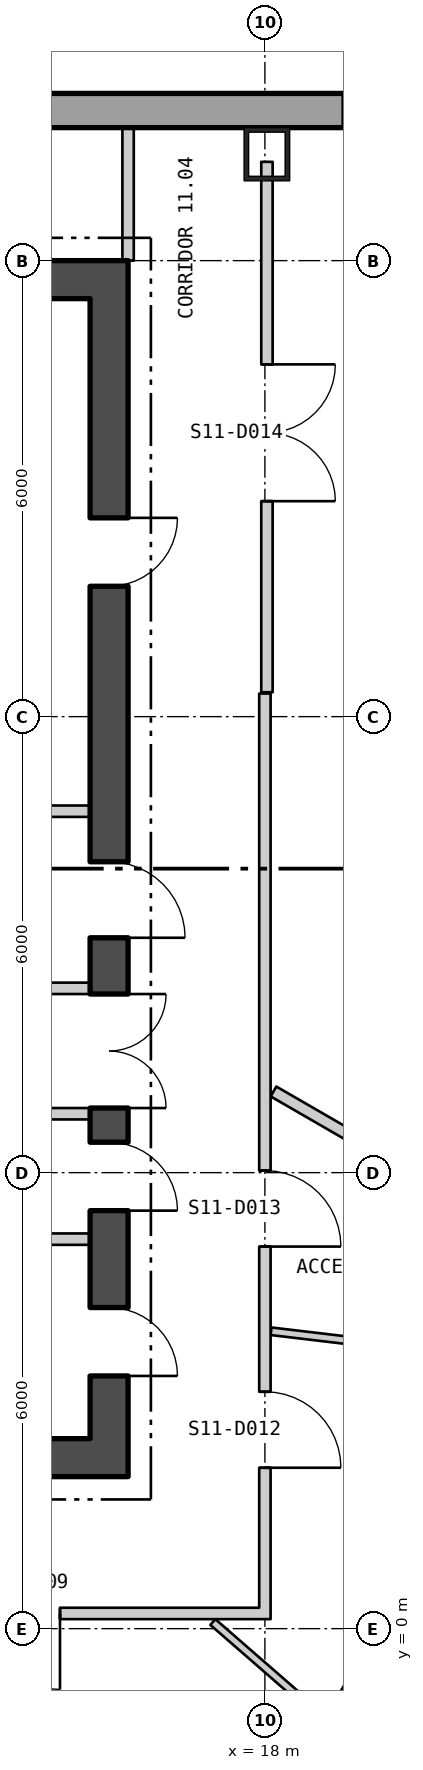
"""IFC4 building model, lengths in metres.
Left out: names, types, materials, properties, quantities, classifications, styles, units other than length and angle.
Written with IfcOpenShell. Run it as: python <this file> out.ifc"""

import sys

from ifc_helpers import new_model, si_unit, direction, frame, frame_2d, origin, origin_2d, place, context, subcontext, project, spatial, polyline, rectangle, hollow_rectangle, outline, extrude, element, fill, save


model = new_model("IFC4")
c1 = context("Model", 3, precision=1e-05, world=origin(), true_north=direction((0.0, 1.0)))
c2 = subcontext(c1, "Body", "Model", "MODEL_VIEW")
j1 = project(units=[si_unit("LENGTHUNIT", "METRE"), si_unit("PLANEANGLEUNIT", "RADIAN")], contexts=[c1])
p1 = place(None, origin())
s1 = spatial("IfcSite", under=j1, at=p1, CompositionType="ELEMENT")
p2 = place(p1, origin())
s2 = spatial("IfcBuilding", under=s1, at=p2, CompositionType="ELEMENT")
p3 = place(p2, frame((0.0, 0.0, 151.5)))
s3 = spatial("IfcBuildingStorey", under=s2, at=p3, CompositionType="ELEMENT", Elevation=151.5)
p4 = place(p3, frame((18.026, 19.4, 0.0), z_axis=(0.0, 0.0, 1.0), x_axis=(-1.0, 0.0, 0.0)))
e1 = element("IfcColumn", 1, at=p4, inside=s3, PredefinedType="COLUMN", context=c2, shape_type="SweptSolid", body=[
    extrude(hollow_rectangle(XDim=0.6, YDim=0.7, WallThickness=0.06, at=origin_2d()), origin(), (0.0, 0.0, 1.0), 3.9),
])
p5 = place(p3, frame((22.865, 19.975, -0.4), z_axis=(0.0, 0.0, 1.0), x_axis=(-1.0, 0.0, 0.0)))
e2 = element("IfcWall", 2, at=p5, inside=s3, PredefinedType="SOLIDWALL", context=c2, shape_type="SweptSolid", body=[
    extrude(outline(polyline([(-0.13, -0.225), (45.86, -0.225), (45.6, 0.225), (0.13, 0.225), (-0.13, -0.225)])), origin(), (0.0, 0.0, 1.0), 3.9),
])
p6 = place(p5, frame((1.424, 0.0, 1.3)))
e3 = element("IfcOpeningElement", 3, at=p6, cuts=e2, PredefinedType="OPENING", context=c2, shape_type="SweptSolid", body=[
    extrude(rectangle(XDim=2.4, YDim=2.0, at=frame_2d((1.2, 1.0))), frame((0.0, 0.235, 0.0), z_axis=(0.0, -1.0, 0.0), x_axis=(1.0, 0.0, 0.0)), (0.0, 0.0, 1.0), 0.47),
])
p7 = place(p5, frame((10.399, 0.0, 1.3)))
e4 = element("IfcOpeningElement", 4, at=p7, cuts=e2, PredefinedType="OPENING", context=c2, shape_type="SweptSolid", body=[
    extrude(rectangle(XDim=2.4, YDim=2.0, at=frame_2d((1.2, 1.0))), frame((0.0, 0.235, 0.0), z_axis=(0.0, -1.0, 0.0), x_axis=(1.0, 0.0, 0.0)), (0.0, 0.0, 1.0), 0.47),
])
p8 = place(p5, frame((14.905, 0.0, 1.3)))
e5 = element("IfcOpeningElement", 5, at=p8, cuts=e2, PredefinedType="OPENING", context=c2, shape_type="SweptSolid", body=[
    extrude(rectangle(XDim=2.4, YDim=2.0, at=frame_2d((1.2, 1.0))), frame((0.0, 0.235, 0.0), z_axis=(0.0, -1.0, 0.0), x_axis=(1.0, 0.0, 0.0)), (0.0, 0.0, 1.0), 0.47),
])
p9 = place(p5, frame((19.412, 0.0, 1.3)))
e6 = element("IfcOpeningElement", 6, at=p9, cuts=e2, PredefinedType="OPENING", context=c2, shape_type="SweptSolid", body=[
    extrude(rectangle(XDim=2.4, YDim=2.0, at=frame_2d((1.2, 1.0))), frame((0.0, 0.235, 0.0), z_axis=(0.0, -1.0, 0.0), x_axis=(1.0, 0.0, 0.0)), (0.0, 0.0, 1.0), 0.47),
])
p10 = place(p5, frame((23.918, 0.0, 1.3)))
e7 = element("IfcOpeningElement", 7, at=p10, cuts=e2, PredefinedType="OPENING", context=c2, shape_type="SweptSolid", body=[
    extrude(rectangle(XDim=2.4, YDim=2.0, at=frame_2d((1.2, 1.0))), frame((0.0, 0.235, 0.0), z_axis=(0.0, -1.0, 0.0), x_axis=(1.0, 0.0, 0.0)), (0.0, 0.0, 1.0), 0.47),
])
p11 = place(p5, frame((28.425, 0.0, 1.3)))
e8 = element("IfcOpeningElement", 8, at=p11, cuts=e2, PredefinedType="OPENING", context=c2, shape_type="SweptSolid", body=[
    extrude(rectangle(XDim=2.4, YDim=2.0, at=frame_2d((1.2, 1.0))), frame((0.0, 0.235, 0.0), z_axis=(0.0, -1.0, 0.0), x_axis=(1.0, 0.0, 0.0)), (0.0, 0.0, 1.0), 0.47),
])
p12 = place(p5, frame((32.932, 0.0, 1.3)))
e9 = element("IfcOpeningElement", 9, at=p12, cuts=e2, PredefinedType="OPENING", context=c2, shape_type="SweptSolid", body=[
    extrude(rectangle(XDim=2.4, YDim=2.0, at=frame_2d((1.2, 1.0))), frame((0.0, 0.235, 0.0), z_axis=(0.0, -1.0, 0.0), x_axis=(1.0, 0.0, 0.0)), (0.0, 0.0, 1.0), 0.47),
])
p13 = place(p5, frame((37.438, 0.0, 1.3)))
e10 = element("IfcOpeningElement", 10, at=p13, cuts=e2, PredefinedType="OPENING", context=c2, shape_type="SweptSolid", body=[
    extrude(rectangle(XDim=2.4, YDim=2.0, at=frame_2d((1.2, 1.0))), frame((0.0, 0.235, 0.0), z_axis=(0.0, -1.0, 0.0), x_axis=(1.0, 0.0, 0.0)), (0.0, 0.0, 1.0), 0.47),
])
p14 = place(p5, frame((41.907, 0.0, 1.3)))
e11 = element("IfcOpeningElement", 11, at=p14, cuts=e2, PredefinedType="OPENING", context=c2, shape_type="SweptSolid", body=[
    extrude(rectangle(XDim=2.4, YDim=2.0, at=frame_2d((1.2, 1.0))), frame((0.0, 0.235, 0.0), z_axis=(0.0, -1.0, 0.0), x_axis=(1.0, 0.0, 0.0)), (0.0, 0.0, 1.0), 0.47),
])
p15 = place(p3, frame((4.21, -26.921, -0.18), z_axis=(0.0, 0.0, 1.0), x_axis=(0.500000141277, 0.866025322218, 0.0)))
e12 = element("IfcWall", 12, at=p15, inside=s3, PredefinedType="SOLIDWALL", context=c2, shape_type="SweptSolid", body=[
    extrude(outline(polyline([(-0.13, -0.225), (45.86, -0.225), (45.6, 0.225), (0.13, 0.225), (-0.13, -0.225)])), origin(), (0.0, 0.0, 1.0), 3.68),
])
p16 = place(p15, frame((1.424, 0.0, 1.08)))
e13 = element("IfcOpeningElement", 13, at=p16, cuts=e12, PredefinedType="OPENING", context=c2, shape_type="SweptSolid", body=[
    extrude(rectangle(XDim=2.4, YDim=2.0, at=frame_2d((1.2, 1.0))), frame((0.0, 0.235, 0.0), z_axis=(0.0, -1.0, 0.0), x_axis=(1.0, 0.0, 0.0)), (0.0, 0.0, 1.0), 0.47),
])
p17 = place(p15, frame((5.892, 0.0, 1.08)))
e14 = element("IfcOpeningElement", 14, at=p17, cuts=e12, PredefinedType="OPENING", context=c2, shape_type="SweptSolid", body=[
    extrude(rectangle(XDim=2.4, YDim=2.0, at=frame_2d((1.2, 1.0))), frame((0.0, 0.235, 0.0), z_axis=(0.0, -1.0, 0.0), x_axis=(1.0, 0.0, 0.0)), (0.0, 0.0, 1.0), 0.47),
])
p18 = place(p15, frame((10.399, 0.0, 1.08)))
e15 = element("IfcOpeningElement", 15, at=p18, cuts=e12, PredefinedType="OPENING", context=c2, shape_type="SweptSolid", body=[
    extrude(rectangle(XDim=2.4, YDim=2.0, at=frame_2d((1.2, 1.0))), frame((0.0, 0.235, 0.0), z_axis=(0.0, -1.0, 0.0), x_axis=(1.0, 0.0, 0.0)), (0.0, 0.0, 1.0), 0.47),
])
p19 = place(p15, frame((14.905, 0.0, 1.08)))
e16 = element("IfcOpeningElement", 16, at=p19, cuts=e12, PredefinedType="OPENING", context=c2, shape_type="SweptSolid", body=[
    extrude(rectangle(XDim=2.4, YDim=2.0, at=frame_2d((1.2, 1.0))), frame((0.0, 0.235, 0.0), z_axis=(0.0, -1.0, 0.0), x_axis=(1.0, 0.0, 0.0)), (0.0, 0.0, 1.0), 0.47),
])
p20 = place(p15, frame((19.412, 0.0, 1.08)))
e17 = element("IfcOpeningElement", 17, at=p20, cuts=e12, PredefinedType="OPENING", context=c2, shape_type="SweptSolid", body=[
    extrude(rectangle(XDim=2.4, YDim=2.0, at=frame_2d((1.2, 1.0))), frame((0.0, 0.235, 0.0), z_axis=(0.0, -1.0, 0.0), x_axis=(1.0, 0.0, 0.0)), (0.0, 0.0, 1.0), 0.47),
])
p21 = place(p15, frame((23.918, 0.0, 1.08)))
e18 = element("IfcOpeningElement", 18, at=p21, cuts=e12, PredefinedType="OPENING", context=c2, shape_type="SweptSolid", body=[
    extrude(rectangle(XDim=2.4, YDim=2.0, at=frame_2d((1.2, 1.0))), frame((0.0, 0.235, 0.0), z_axis=(0.0, -1.0, 0.0), x_axis=(1.0, 0.0, 0.0)), (0.0, 0.0, 1.0), 0.47),
])
p22 = place(p15, frame((37.438, 0.0, 1.08)))
e19 = element("IfcOpeningElement", 19, at=p22, cuts=e12, PredefinedType="OPENING", context=c2, shape_type="SweptSolid", body=[
    extrude(rectangle(XDim=2.4, YDim=2.0, at=frame_2d((1.2, 1.0))), frame((0.0, 0.235, 0.0), z_axis=(0.0, -1.0, 0.0), x_axis=(1.0, 0.0, 0.0)), (0.0, 0.0, 1.0), 0.47),
])
p23 = place(p15, frame((41.907, 0.0, 1.08)))
e20 = element("IfcOpeningElement", 20, at=p23, cuts=e12, PredefinedType="OPENING", context=c2, shape_type="SweptSolid", body=[
    extrude(rectangle(XDim=2.4, YDim=2.0, at=frame_2d((1.2, 1.0))), frame((0.0, 0.235, 0.0), z_axis=(0.0, -1.0, 0.0), x_axis=(1.0, 0.0, 0.0)), (0.0, 0.0, 1.0), 0.47),
])
p24 = place(p3, frame((-16.2, 2.25, 0.0), z_axis=(0.0, 0.0, 1.0), x_axis=(1.0, 0.0, 0.0)))
e21 = element("IfcWall", 21, at=p24, inside=s3, PredefinedType="SHEAR", context=c2, shape_type="SweptSolid", body=[
    extrude(rectangle(XDim=32.4, YDim=0.5, at=frame_2d((16.2, 0.0))), origin(), (0.0, 0.0, 1.0), 3.7),
])
p25 = place(p24, frame((10.7, 0.0, 0.0)))
e22 = element("IfcOpeningElement", 22, at=p25, cuts=e21, PredefinedType="OPENING", context=c2, shape_type="SweptSolid", body=[
    extrude(rectangle(XDim=1.8, YDim=2.4, at=frame_2d((0.9, 1.2))), frame((0.0, 0.26, 0.0), z_axis=(0.0, -1.0, 0.0), x_axis=(1.0, 0.0, 0.0)), (0.0, 0.0, 1.0), 0.52),
])
p26 = place(p24, frame((20.7, 0.0, 0.0)))
e23 = element("IfcOpeningElement", 23, at=p26, cuts=e21, PredefinedType="OPENING", context=c2, shape_type="SweptSolid", body=[
    extrude(rectangle(XDim=1.8, YDim=2.4, at=frame_2d((0.9, 1.2))), frame((0.0, 0.26, 0.0), z_axis=(0.0, -1.0, 0.0), x_axis=(1.0, 0.0, 0.0)), (0.0, 0.0, 1.0), 0.52),
])
p27 = place(p3, frame((-16.2, 17.75, 0.0), z_axis=(0.0, 0.0, 1.0), x_axis=(1.0, 0.0, 0.0)))
e24 = element("IfcWall", 24, at=p27, inside=s3, PredefinedType="SHEAR", context=c2, shape_type="SweptSolid", body=[
    extrude(rectangle(XDim=32.4, YDim=0.5, at=frame_2d((16.2, 0.0))), origin(), (0.0, 0.0, 1.0), 3.7),
])
p28 = place(p3, frame((15.95, 2.5, 0.0), z_axis=(0.0, 0.0, 1.0), x_axis=(0.0, 1.0, 0.0)))
e25 = element("IfcWall", 25, at=p28, inside=s3, PredefinedType="SHEAR", context=c2, shape_type="SweptSolid", body=[
    extrude(rectangle(XDim=15.0, YDim=0.5, at=frame_2d((7.5, 0.0))), origin(), (0.0, 0.0, 1.0), 3.7),
])
p29 = place(p28, frame((4.35, 0.0, 0.0)))
e26 = element("IfcOpeningElement", 26, at=p29, cuts=e25, PredefinedType="OPENING", context=c2, shape_type="SweptSolid", body=[
    extrude(rectangle(XDim=1.5, YDim=2.1, at=frame_2d((0.75, 1.05))), frame((0.0, 0.26, 0.0), z_axis=(0.0, -1.0, 0.0), x_axis=(1.0, 0.0, 0.0)), (0.0, 0.0, 1.0), 0.52),
])
p30 = place(p28, frame((0.825, 0.0, 0.0)))
e27 = element("IfcOpeningElement", 27, at=p30, cuts=e25, PredefinedType="OPENING", context=c2, shape_type="SweptSolid", body=[
    extrude(rectangle(XDim=0.9, YDim=2.1, at=frame_2d((0.45, 1.05))), frame((0.0, 0.26, 0.0), z_axis=(0.0, -1.0, 0.0), x_axis=(1.0, 0.0, 0.0)), (0.0, 0.0, 1.0), 0.52),
])
p31 = place(p28, frame((3.0, 0.0, 0.0)))
e28 = element("IfcOpeningElement", 28, at=p31, cuts=e25, PredefinedType="OPENING", context=c2, shape_type="SweptSolid", body=[
    extrude(rectangle(XDim=0.9, YDim=2.1, at=frame_2d((0.45, 1.05))), frame((0.0, 0.26, 0.0), z_axis=(0.0, -1.0, 0.0), x_axis=(1.0, 0.0, 0.0)), (0.0, 0.0, 1.0), 0.52),
])
p32 = place(p28, frame((6.59, 0.0, 0.0)))
e29 = element("IfcOpeningElement", 29, at=p32, cuts=e25, PredefinedType="OPENING", context=c2, shape_type="SweptSolid", body=[
    extrude(rectangle(XDim=1.0, YDim=2.1, at=frame_2d((0.5, 1.05))), frame((0.0, 0.26, 0.0), z_axis=(0.0, -1.0, 0.0), x_axis=(1.0, 0.0, 0.0)), (0.0, 0.0, 1.0), 0.52),
])
p33 = place(p28, frame((11.215, 0.0, 0.0)))
e30 = element("IfcOpeningElement", 30, at=p33, cuts=e25, PredefinedType="OPENING", context=c2, shape_type="SweptSolid", body=[
    extrude(rectangle(XDim=0.9, YDim=2.1, at=frame_2d((0.45, 1.05))), frame((0.0, 0.26, 0.0), z_axis=(0.0, -1.0, 0.0), x_axis=(1.0, 0.0, 0.0)), (0.0, 0.0, 1.0), 0.52),
])
for number, where, z_axis, x_axis in (
    (31, (14.5, 6.775, 0.0), (0.0, 0.0, 1.0), (1.0, 0.0, 0.0)),
    (32, (14.5, 8.425, 0.0), (0.0, 0.0, 1.0), (1.0, 0.0, 0.0)),
    (33, (14.5, 5.125, 0.0), (0.0, 0.0, 1.0), (1.0, 0.0, 0.0)),
    (34, (14.5, 10.756, 0.0), (0.0, 0.0, 1.0), (1.0, 0.0, 0.0)),
):
    element("IfcWall", number, at=place(p3, frame(where, z_axis=z_axis, x_axis=x_axis)), inside=s3, PredefinedType="PARTITIONING", context=c2, shape_type="SweptSolid", body=[
        extrude(rectangle(XDim=1.2, YDim=0.15, at=frame_2d((0.6, 0.0))), origin(), (0.0, 0.0, 1.0), 3.7),
    ])
p34 = place(p3, frame((7.17, 0.2, 0.0), z_axis=(0.0, 0.0, 1.0), x_axis=(1.0, 0.0, 0.0)))
e35 = element("IfcWall", 35, at=p34, inside=s3, PredefinedType="PARTITIONING", context=c2, shape_type="SweptSolid", body=[
    extrude(rectangle(XDim=10.755, YDim=0.15, at=frame_2d((5.378, 0.0))), origin(), (0.0, 0.0, 1.0), 3.7),
])
p35 = place(p34, frame((7.134, 0.0, 0.0)))
e36 = element("IfcOpeningElement", 36, at=p35, cuts=e35, PredefinedType="OPENING", context=c2, shape_type="SweptSolid", body=[
    extrude(rectangle(XDim=1.0, YDim=2.1, at=frame_2d((0.5, 1.05))), frame((0.0, 0.085, 0.0), z_axis=(0.0, -1.0, 0.0), x_axis=(1.0, 0.0, 0.0)), (0.0, 0.0, 1.0), 0.17),
])
p36 = place(p3, frame((12.222, 0.06, 0.0), z_axis=(0.0, 0.0, 1.0), x_axis=(0.866077922096, -0.499909024581, 0.0)))
e37 = element("IfcWall", 37, at=p36, inside=s3, PredefinedType="PARTITIONING", context=c2, shape_type="SweptSolid", body=[
    extrude(rectangle(XDim=5.877, YDim=0.15, at=frame_2d((2.939, 0.0))), origin(), (0.0, 0.0, 1.0), 3.7),
])
p37 = place(p3, frame((16.2, 18.0, 0.0), z_axis=(0.0, 0.0, 1.0), x_axis=(0.0, 1.0, 0.0)))
e38 = element("IfcWall", 38, at=p37, inside=s3, PredefinedType="PARTITIONING", context=c2, shape_type="SweptSolid", body=[
    extrude(rectangle(XDim=1.75, YDim=0.15, at=frame_2d((0.875, 0.0))), origin(), (0.0, 0.0, 1.0), 3.7),
])
p38 = place(p3, frame((17.315, 0.087, 0.0), z_axis=(0.0, 0.0, 1.0), x_axis=(0.754244081951, -0.656594140121, 0.0)))
e39 = element("IfcWall", 39, at=p38, inside=s3, PredefinedType="PARTITIONING", context=c2, shape_type="SweptSolid", body=[
    extrude(rectangle(XDim=1.966, YDim=0.1, at=frame_2d((0.983, 0.0))), origin(), (0.0, 0.0, 1.0), 3.7),
])
p39 = place(p3, frame((18.0, 0.125, 0.0), z_axis=(0.0, 0.0, 1.0), x_axis=(0.0, 1.0, 0.0)))
e40 = element("IfcWall", 40, at=p39, inside=s3, PredefinedType="PARTITIONING", context=c2, shape_type="SweptSolid", body=[
    extrude(rectangle(XDim=12.179, YDim=0.15, at=frame_2d((6.09, 0.0))), origin(), (0.0, 0.0, 1.0), 3.7),
])
p40 = place(p39, frame((1.992, 0.0, 0.0)))
e41 = element("IfcOpeningElement", 41, at=p40, cuts=e40, PredefinedType="OPENING", context=c2, shape_type="SweptSolid", body=[
    extrude(rectangle(XDim=1.0, YDim=2.1, at=frame_2d((0.5, 1.05))), frame((0.0, 0.085, 0.0), z_axis=(0.0, -1.0, 0.0), x_axis=(1.0, 0.0, 0.0)), (0.0, 0.0, 1.0), 0.17),
])
p41 = place(p39, frame((4.902, 0.0, 0.0)))
e42 = element("IfcOpeningElement", 42, at=p41, cuts=e40, PredefinedType="OPENING", context=c2, shape_type="SweptSolid", body=[
    extrude(rectangle(XDim=1.0, YDim=2.1, at=frame_2d((0.5, 1.05))), frame((0.0, 0.085, 0.0), z_axis=(0.0, -1.0, 0.0), x_axis=(1.0, 0.0, 0.0)), (0.0, 0.0, 1.0), 0.17),
])
p42 = place(p3, frame((18.027, 12.321, 0.0), z_axis=(0.0, 0.0, 1.0), x_axis=(0.0, 1.0, 0.0)))
e43 = element("IfcWall", 43, at=p42, inside=s3, PredefinedType="PARTITIONING", context=c2, shape_type="SweptSolid", body=[
    extrude(rectangle(XDim=6.979, YDim=0.15, at=frame_2d((3.49, 0.0))), origin(), (0.0, 0.0, 1.0), 3.7),
])
p43 = place(p42, frame((2.514, 0.0, 0.0)))
e44 = element("IfcOpeningElement", 44, at=p43, cuts=e43, PredefinedType="OPENING", context=c2, shape_type="SweptSolid", body=[
    extrude(rectangle(XDim=1.8, YDim=2.1, at=frame_2d((0.9, 1.05))), frame((0.0, 0.085, 0.0), z_axis=(0.0, -1.0, 0.0), x_axis=(1.0, 0.0, 0.0)), (0.0, 0.0, 1.0), 0.17),
])
p44 = place(p3, frame((18.081, 3.913, 0.0), z_axis=(0.0, 0.0, 1.0), x_axis=(0.993015725956, -0.11798206645, 0.0)))
e45 = element("IfcWall", 45, at=p44, inside=s3, PredefinedType="PARTITIONING", context=c2, shape_type="SweptSolid", body=[
    extrude(rectangle(XDim=3.458, YDim=0.1, at=frame_2d((1.729, 0.0))), origin(), (0.0, 0.0, 1.0), 3.7),
])
p45 = place(p3, frame((18.113, 7.068, 0.0), z_axis=(0.0, 0.0, 1.0), x_axis=(0.865932559475, -0.500160776593, 0.0)))
e46 = element("IfcWall", 46, at=p45, inside=s3, PredefinedType="PARTITIONING", context=c2, shape_type="SweptSolid", body=[
    extrude(rectangle(XDim=4.279, YDim=0.15, at=frame_2d((2.139, 0.0))), origin(), (0.0, 0.0, 1.0), 3.7),
])
p46 = place(p29, origin())
e47 = element("IfcDoor", 47, at=p46, inside=s3, OperationType="DOUBLE_DOOR_SINGLE_SWING", PredefinedType="DOOR", context=c2, shape_type="SweptSolid", body=[
    extrude(rectangle(XDim=1.5, YDim=2.1, at=frame_2d((0.75, 1.05))), frame((0.0, 0.025, 0.0), z_axis=(0.0, -1.0, 0.0), x_axis=(1.0, 0.0, 0.0)), (0.0, 0.0, 1.0), 0.05),
])
fill(e26, e47)
p47 = place(p30, origin())
e48 = element("IfcDoor", 48, at=p47, inside=s3, OperationType="SINGLE_SWING_LEFT", PredefinedType="DOOR", context=c2, shape_type="SweptSolid", body=[
    extrude(rectangle(XDim=0.9, YDim=2.1, at=frame_2d((0.45, 1.05))), frame((0.0, 0.025, 0.0), z_axis=(0.0, -1.0, 0.0), x_axis=(1.0, 0.0, 0.0)), (0.0, 0.0, 1.0), 0.05),
])
fill(e27, e48)
p48 = place(p31, origin())
e49 = element("IfcDoor", 49, at=p48, inside=s3, OperationType="SINGLE_SWING_LEFT", PredefinedType="DOOR", context=c2, shape_type="SweptSolid", body=[
    extrude(rectangle(XDim=0.9, YDim=2.1, at=frame_2d((0.45, 1.05))), frame((0.0, 0.025, 0.0), z_axis=(0.0, -1.0, 0.0), x_axis=(1.0, 0.0, 0.0)), (0.0, 0.0, 1.0), 0.05),
])
fill(e28, e49)
p49 = place(p32, origin())
e50 = element("IfcDoor", 50, at=p49, inside=s3, OperationType="SINGLE_SWING_LEFT", PredefinedType="DOOR", context=c2, shape_type="SweptSolid", body=[
    extrude(rectangle(XDim=1.0, YDim=2.1, at=frame_2d((0.5, 1.05))), frame((0.0, 0.025, 0.0), z_axis=(0.0, -1.0, 0.0), x_axis=(1.0, 0.0, 0.0)), (0.0, 0.0, 1.0), 0.05),
])
fill(e29, e50)
p50 = place(p33, origin())
e51 = element("IfcDoor", 51, at=p50, inside=s3, OperationType="SINGLE_SWING_RIGHT", PredefinedType="DOOR", context=c2, shape_type="SweptSolid", body=[
    extrude(rectangle(XDim=0.9, YDim=2.1, at=frame_2d((0.45, 1.05))), frame((0.0, 0.025, 0.0), z_axis=(0.0, -1.0, 0.0), x_axis=(1.0, 0.0, 0.0)), (0.0, 0.0, 1.0), 0.05),
])
fill(e30, e51)
p51 = place(p35, origin())
e52 = element("IfcDoor", 52, at=p51, inside=s3, OperationType="SINGLE_SWING_RIGHT", PredefinedType="DOOR", context=c2, shape_type="SweptSolid", body=[
    extrude(rectangle(XDim=1.0, YDim=2.1, at=frame_2d((0.5, 1.05))), frame((0.0, 0.025, 0.0), z_axis=(0.0, -1.0, 0.0), x_axis=(1.0, 0.0, 0.0)), (0.0, 0.0, 1.0), 0.05),
])
fill(e36, e52)
p52 = place(p40, origin())
e53 = element("IfcDoor", 53, at=p52, inside=s3, OperationType="SINGLE_SWING_LEFT", PredefinedType="DOOR", context=c2, shape_type="SweptSolid", body=[
    extrude(rectangle(XDim=1.0, YDim=2.1, at=frame_2d((0.5, 1.05))), frame((0.0, 0.025, 0.0), z_axis=(0.0, -1.0, 0.0), x_axis=(1.0, 0.0, 0.0)), (0.0, 0.0, 1.0), 0.05),
])
fill(e41, e53)
p53 = place(p41, origin())
e54 = element("IfcDoor", 54, at=p53, inside=s3, OperationType="SINGLE_SWING_LEFT", PredefinedType="DOOR", context=c2, shape_type="SweptSolid", body=[
    extrude(rectangle(XDim=1.0, YDim=2.1, at=frame_2d((0.5, 1.05))), frame((0.0, 0.025, 0.0), z_axis=(0.0, -1.0, 0.0), x_axis=(1.0, 0.0, 0.0)), (0.0, 0.0, 1.0), 0.05),
])
fill(e42, e54)
p54 = place(p43, origin())
e55 = element("IfcDoor", 55, at=p54, inside=s3, OperationType="DOUBLE_DOOR_SINGLE_SWING", PredefinedType="DOOR", context=c2, shape_type="SweptSolid", body=[
    extrude(rectangle(XDim=1.8, YDim=2.1, at=frame_2d((0.9, 1.05))), frame((0.0, 0.025, 0.0), z_axis=(0.0, -1.0, 0.0), x_axis=(1.0, 0.0, 0.0)), (0.0, 0.0, 1.0), 0.05),
])
fill(e44, e55)
save(model, sys.argv[1])
